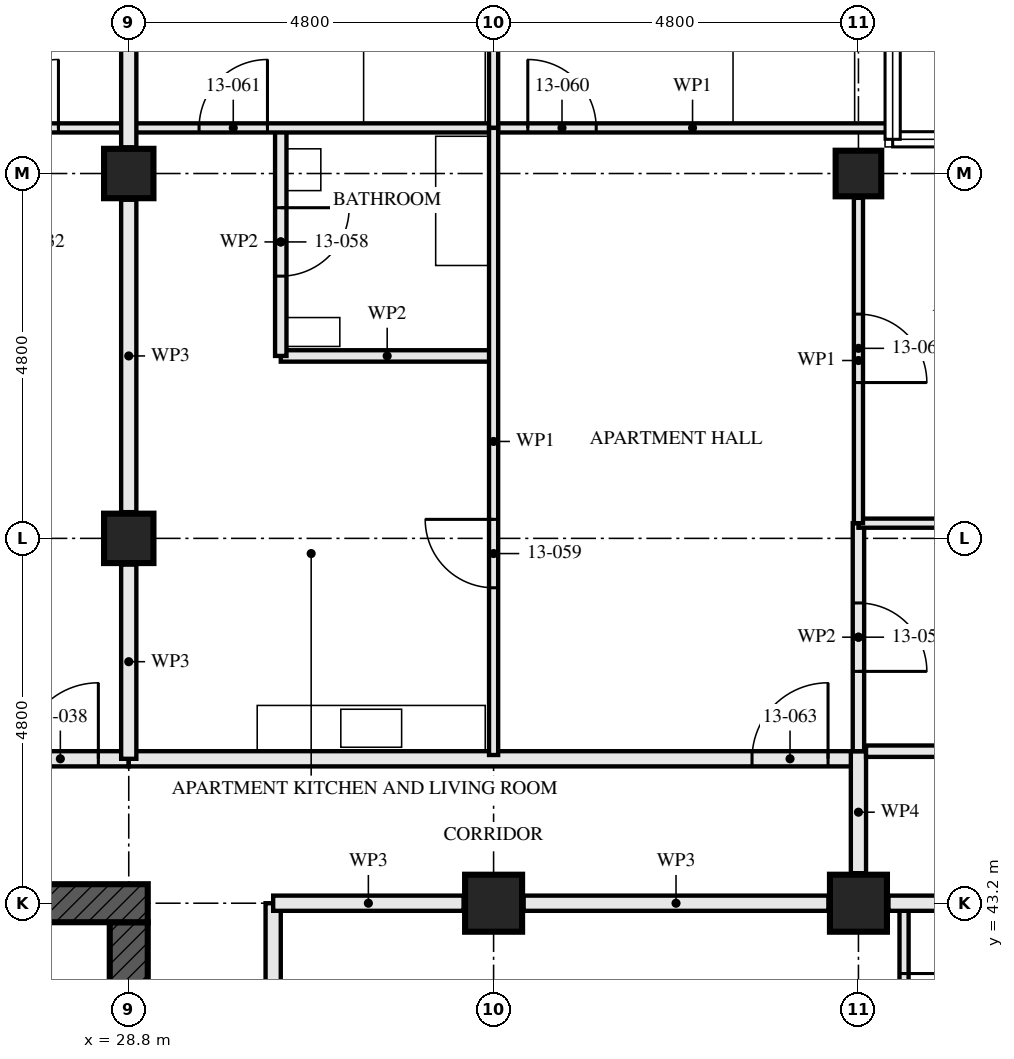
"""IFC4 building model, lengths in metres.
Left out: names, types, materials, properties, quantities, classifications, styles, units other than length and angle.
Written with IfcOpenShell. Run it as: python <this file> out.ifc"""

import sys

from ifc_helpers import new_model, si_unit, direction, frame, frame_2d, origin, origin_2d, place, context, subcontext, project, spatial, rectangle, hollow_rectangle, extrude, element, fill, save


model = new_model("IFC4")
c1 = context("Model", 3, precision=1e-05, world=origin(), true_north=direction((0.0, 1.0)))
c2 = subcontext(c1, "Body", "Model", "MODEL_VIEW")
j1 = project(units=[si_unit("LENGTHUNIT", "METRE"), si_unit("PLANEANGLEUNIT", "RADIAN")], contexts=[c1])
p1 = place(None, origin())
s1 = spatial("IfcSite", under=j1, at=p1, CompositionType="ELEMENT")
p2 = place(p1, origin())
s2 = spatial("IfcBuilding", under=s1, at=p2, CompositionType="ELEMENT")
p3 = place(p2, frame((0.0, 0.0, 51.5)))
s3 = spatial("IfcBuildingStorey", under=s2, at=p3, CompositionType="ELEMENT", Elevation=51.5)
for number, where, z_axis, x_axis in (
    (1, (28.8, 48.0, 0.0), (0.0, 0.0, 1.0), (1.0, 0.0, 0.0)),
    (2, (28.8, 52.8, 0.0), (0.0, 0.0, 1.0), (1.0, 0.0, 0.0)),
):
    element("IfcColumn", number, at=place(p3, frame(where, z_axis=z_axis, x_axis=x_axis)), inside=s3, PredefinedType="COLUMN", context=c2, shape_type="SweptSolid", body=[
        extrude(hollow_rectangle(XDim=0.65, YDim=0.65, WallThickness=0.05, at=origin_2d()), origin(), (0.0, 0.0, 1.0), 3.5),
    ])
for number, where, z_axis, x_axis in (
    (3, (33.6, 43.2, 0.0), (0.0, 0.0, 1.0), (0.0, 1.0, 0.0)),
    (4, (38.4, 43.2, 0.0), (0.0, 0.0, 1.0), (0.0, 1.0, 0.0)),
):
    element("IfcColumn", number, at=place(p3, frame(where, z_axis=z_axis, x_axis=x_axis)), inside=s3, PredefinedType="COLUMN", context=c2, shape_type="SweptSolid", body=[
        extrude(hollow_rectangle(XDim=0.75, YDim=0.75, WallThickness=0.08, at=origin_2d()), origin(), (0.0, 0.0, 1.0), 3.5),
    ])
p4 = place(p3, frame((38.4, 52.8, 0.0), z_axis=(0.0, 0.0, 1.0), x_axis=(0.0, 1.0, 0.0)))
e5 = element("IfcColumn", 5, at=p4, inside=s3, PredefinedType="COLUMN", context=c2, shape_type="SweptSolid", body=[
    extrude(hollow_rectangle(XDim=0.6, YDim=0.6, WallThickness=0.05, at=origin_2d()), origin(), (0.0, 0.0, 1.0), 3.5),
])
p5 = place(p3, frame((29.05, 43.2, -0.17), z_axis=(0.0, 0.0, 1.0), x_axis=(-1.0, 0.0, 0.0)))
e6 = element("IfcWall", 6, at=p5, inside=s3, PredefinedType="SHEAR", context=c2, shape_type="SweptSolid", body=[
    extrude(rectangle(XDim=14.9, YDim=0.5, at=frame_2d((7.45, 0.0))), origin(), (0.0, 0.0, 1.0), 3.5),
])
p6 = place(p5, frame((6.85, 0.0, 0.17)))
e7 = element("IfcOpeningElement", 7, at=p6, cuts=e6, PredefinedType="OPENING", context=c2, shape_type="SweptSolid", body=[
    extrude(rectangle(XDim=1.2, YDim=2.1, at=frame_2d((0.6, 1.05))), frame((0.0, 0.26, 0.0), z_axis=(0.0, -1.0, 0.0), x_axis=(1.0, 0.0, 0.0)), (0.0, 0.0, 1.0), 0.521),
])
p7 = place(p3, frame((28.8, 29.05, -0.17), z_axis=(0.0, 0.0, 1.0), x_axis=(0.0, 1.0, 0.0)))
e8 = element("IfcWall", 8, at=p7, inside=s3, PredefinedType="SHEAR", context=c2, shape_type="SweptSolid", body=[
    extrude(rectangle(XDim=13.9, YDim=0.5, at=frame_2d((6.95, 0.0))), origin(), (0.0, 0.0, 1.0), 3.5),
])
p8 = place(p7, frame((6.35, 0.0, 0.17)))
e9 = element("IfcOpeningElement", 9, at=p8, cuts=e8, PredefinedType="OPENING", context=c2, shape_type="SweptSolid", body=[
    extrude(rectangle(XDim=1.2, YDim=2.1, at=frame_2d((0.6, 1.05))), frame((0.0, 0.26, 0.0), z_axis=(0.0, -1.0, 0.0), x_axis=(1.0, 0.0, 0.0)), (0.0, 0.0, 1.0), 0.521),
])
p9 = place(p3, frame((28.8, 53.4, 0.0), z_axis=(0.0, 0.0, 1.0), x_axis=(-1.0, 0.0, 0.0)))
e10 = element("IfcWall", 10, at=p9, inside=s3, PredefinedType="PARTITIONING", context=c2, shape_type="SweptSolid", body=[
    extrude(rectangle(XDim=4.8, YDim=0.12, at=frame_2d((2.4, 0.0))), origin(), (0.0, 0.0, 1.0), 3.33),
])
p10 = place(p9, frame((0.925, 0.0, 0.0)))
e11 = element("IfcOpeningElement", 11, at=p10, cuts=e10, PredefinedType="OPENING", context=c2, shape_type="SweptSolid", body=[
    extrude(rectangle(XDim=0.9, YDim=2.1, at=frame_2d((0.45, 1.05))), frame((0.0, 0.071, 0.0), z_axis=(0.0, -1.0, 0.0), x_axis=(1.0, 0.0, 0.0)), (0.0, 0.0, 1.0), 0.141),
])
p11 = place(p3, frame((28.8, 45.1, 0.0), z_axis=(0.0, 0.0, 1.0), x_axis=(-1.0, 0.0, 0.0)))
e12 = element("IfcWall", 12, at=p11, inside=s3, PredefinedType="PARTITIONING", context=c2, shape_type="SweptSolid", body=[
    extrude(rectangle(XDim=14.4, YDim=0.2, at=frame_2d((7.2, 0.0))), origin(), (0.0, 0.0, 1.0), 3.33),
])
p12 = place(p11, frame((0.4, 0.0, 0.0)))
e13 = element("IfcOpeningElement", 13, at=p12, cuts=e12, PredefinedType="OPENING", context=c2, shape_type="SweptSolid", body=[
    extrude(rectangle(XDim=1.0, YDim=2.1, at=frame_2d((0.5, 1.05))), frame((0.0, 0.111, 0.0), z_axis=(0.0, -1.0, 0.0), x_axis=(1.0, 0.0, 0.0)), (0.0, 0.0, 1.0), 0.221),
])
p13 = place(p11, frame((5.2, 0.0, 0.0)))
e14 = element("IfcOpeningElement", 14, at=p13, cuts=e12, PredefinedType="OPENING", context=c2, shape_type="SweptSolid", body=[
    extrude(rectangle(XDim=1.0, YDim=2.1, at=frame_2d((0.5, 1.05))), frame((0.0, 0.111, 0.0), z_axis=(0.0, -1.0, 0.0), x_axis=(1.0, 0.0, 0.0)), (0.0, 0.0, 1.0), 0.221),
])
p14 = place(p11, frame((10.0, 0.0, 0.0)))
e15 = element("IfcOpeningElement", 15, at=p14, cuts=e12, PredefinedType="OPENING", context=c2, shape_type="SweptSolid", body=[
    extrude(rectangle(XDim=1.0, YDim=2.1, at=frame_2d((0.5, 1.05))), frame((0.0, 0.111, 0.0), z_axis=(0.0, -1.0, 0.0), x_axis=(1.0, 0.0, 0.0)), (0.0, 0.0, 1.0), 0.221),
])
p15 = place(p3, frame((39.0, 38.4, 0.0), z_axis=(0.0, 0.0, 1.0), x_axis=(0.0, 1.0, 0.0)))
e16 = element("IfcWall", 16, at=p15, inside=s3, PredefinedType="PARTITIONING", context=c2, shape_type="SweptSolid", body=[
    extrude(rectangle(XDim=4.8, YDim=0.12, at=frame_2d((2.4, 0.0))), origin(), (0.0, 0.0, 1.0), 3.33),
])
p16 = place(p15, frame((2.975, 0.0, 0.0)))
e17 = element("IfcOpeningElement", 17, at=p16, cuts=e16, PredefinedType="OPENING", context=c2, shape_type="SweptSolid", body=[
    extrude(rectangle(XDim=0.9, YDim=2.1, at=frame_2d((0.45, 1.05))), frame((0.0, 0.071, 0.0), z_axis=(0.0, -1.0, 0.0), x_axis=(1.0, 0.0, 0.0)), (0.0, 0.0, 1.0), 0.141),
])
p17 = place(p3, frame((30.7, 28.8, 0.0), z_axis=(0.0, 0.0, 1.0), x_axis=(0.0, 1.0, 0.0)))
e18 = element("IfcWall", 18, at=p17, inside=s3, PredefinedType="PARTITIONING", context=c2, shape_type="SweptSolid", body=[
    extrude(rectangle(XDim=14.4, YDim=0.2, at=frame_2d((7.2, 0.0))), origin(), (0.0, 0.0, 1.0), 2.55),
])
p18 = place(p17, frame((1.4, 0.0, 0.0)))
e19 = element("IfcOpeningElement", 19, at=p18, cuts=e18, PredefinedType="OPENING", context=c2, shape_type="SweptSolid", body=[
    extrude(rectangle(XDim=1.0, YDim=2.1, at=frame_2d((0.5, 1.05))), frame((0.0, 0.111, 0.0), z_axis=(0.0, -1.0, 0.0), x_axis=(1.0, 0.0, 0.0)), (0.0, 0.0, 1.0), 0.221),
])
p19 = place(p17, frame((4.1, 0.0, 0.0)))
e20 = element("IfcOpeningElement", 20, at=p19, cuts=e18, PredefinedType="OPENING", context=c2, shape_type="SweptSolid", body=[
    extrude(rectangle(XDim=1.0, YDim=2.1, at=frame_2d((0.5, 1.05))), frame((0.0, 0.111, 0.0), z_axis=(0.0, -1.0, 0.0), x_axis=(1.0, 0.0, 0.0)), (0.0, 0.0, 1.0), 0.221),
])
p20 = place(p17, frame((5.975, 0.0, 0.0)))
e21 = element("IfcOpeningElement", 21, at=p20, cuts=e18, PredefinedType="OPENING", context=c2, shape_type="SweptSolid", body=[
    extrude(rectangle(XDim=1.0, YDim=2.1, at=frame_2d((0.5, 1.05))), frame((0.0, 0.111, 0.0), z_axis=(0.0, -1.0, 0.0), x_axis=(1.0, 0.0, 0.0)), (0.0, 0.0, 1.0), 0.221),
])
p21 = place(p17, frame((10.0, 0.0, 0.0)))
e22 = element("IfcOpeningElement", 22, at=p21, cuts=e18, PredefinedType="OPENING", context=c2, shape_type="SweptSolid", body=[
    extrude(rectangle(XDim=1.0, YDim=2.1, at=frame_2d((0.5, 1.05))), frame((0.0, 0.111, 0.0), z_axis=(0.0, -1.0, 0.0), x_axis=(1.0, 0.0, 0.0)), (0.0, 0.0, 1.0), 0.221),
])
p22 = place(p3, frame((38.4, 48.2, 0.0), z_axis=(0.0, 0.0, 1.0), x_axis=(0.0, -1.0, 0.0)))
e23 = element("IfcWall", 23, at=p22, inside=s3, PredefinedType="PARTITIONING", context=c2, shape_type="SweptSolid", body=[
    extrude(rectangle(XDim=3.0, YDim=0.15, at=frame_2d((1.5, 0.0))), origin(), (0.0, 0.0, 1.0), 2.55),
])
p23 = place(p22, frame((1.05, 0.0, 0.0)))
e24 = element("IfcOpeningElement", 24, at=p23, cuts=e23, PredefinedType="OPENING", context=c2, shape_type="SweptSolid", body=[
    extrude(rectangle(XDim=0.9, YDim=2.1, at=frame_2d((0.45, 1.05))), frame((0.0, 0.085, 0.0), z_axis=(0.0, -1.0, 0.0), x_axis=(1.0, 0.0, 0.0)), (0.0, 0.0, 1.0), 0.171),
])
p24 = place(p3, frame((30.8, 53.4, 0.0), z_axis=(0.0, 0.0, 1.0), x_axis=(0.0, -1.0, 0.0)))
e25 = element("IfcWall", 25, at=p24, inside=s3, PredefinedType="PARTITIONING", context=c2, shape_type="SweptSolid", body=[
    extrude(rectangle(XDim=3.0, YDim=0.15, at=frame_2d((1.5, 0.0))), origin(), (0.0, 0.0, 1.0), 2.55),
])
p25 = place(p24, frame((1.05, 0.0, 0.0)))
e26 = element("IfcOpeningElement", 26, at=p25, cuts=e25, PredefinedType="OPENING", context=c2, shape_type="SweptSolid", body=[
    extrude(rectangle(XDim=0.9, YDim=2.1, at=frame_2d((0.45, 1.05))), frame((0.0, 0.085, 0.0), z_axis=(0.0, -1.0, 0.0), x_axis=(1.0, 0.0, 0.0)), (0.0, 0.0, 1.0), 0.171),
])
p26 = place(p3, frame((33.6, 50.4, 0.0), z_axis=(0.0, 0.0, 1.0), x_axis=(-1.0, 0.0, 0.0)))
e27 = element("IfcWall", 27, at=p26, inside=s3, PredefinedType="PARTITIONING", context=c2, shape_type="SweptSolid", body=[
    extrude(rectangle(XDim=2.8, YDim=0.15, at=frame_2d((1.4, 0.0))), origin(), (0.0, 0.0, 1.0), 3.33),
])
p27 = place(p3, frame((33.6, 53.4, 0.0), z_axis=(0.0, 0.0, 1.0), x_axis=(0.0, -1.0, 0.0)))
e28 = element("IfcWall", 28, at=p27, inside=s3, PredefinedType="PARTITIONING", context=c2, shape_type="SweptSolid", body=[
    extrude(rectangle(XDim=8.25, YDim=0.12, at=frame_2d((4.125, 0.0))), origin(), (0.0, 0.0, 1.0), 2.55),
])
p28 = place(p27, frame((5.15, 0.0, 0.0)))
e29 = element("IfcOpeningElement", 29, at=p28, cuts=e28, PredefinedType="OPENING", context=c2, shape_type="SweptSolid", body=[
    extrude(rectangle(XDim=0.9, YDim=2.1, at=frame_2d((0.45, 1.05))), frame((0.0, 0.071, 0.0), z_axis=(0.0, -1.0, 0.0), x_axis=(1.0, 0.0, 0.0)), (0.0, 0.0, 1.0), 0.141),
])
p29 = place(p3, frame((42.953, 48.2, 0.0), z_axis=(0.0, 0.0, 1.0), x_axis=(-1.0, 0.0, 0.0)))
e30 = element("IfcWall", 30, at=p29, inside=s3, PredefinedType="PARTITIONING", context=c2, shape_type="SweptSolid", body=[
    extrude(rectangle(XDim=4.553, YDim=0.12, at=frame_2d((2.276, 0.0))), origin(), (0.0, 0.0, 1.0), 3.33),
])
p30 = place(p3, frame((38.835, 53.4, 0.0), z_axis=(0.0, 0.0, 1.0), x_axis=(-1.0, 0.0, 0.0)))
e31 = element("IfcWall", 31, at=p30, inside=s3, PredefinedType="PARTITIONING", context=c2, shape_type="SweptSolid", body=[
    extrude(rectangle(XDim=5.235, YDim=0.12, at=frame_2d((2.617, 0.0))), origin(), (0.0, 0.0, 1.0), 2.32),
])
p31 = place(p30, frame((3.885, 0.0, 0.0)))
e32 = element("IfcOpeningElement", 32, at=p31, cuts=e31, PredefinedType="OPENING", context=c2, shape_type="SweptSolid", body=[
    extrude(rectangle(XDim=0.9, YDim=2.1, at=frame_2d((0.45, 1.05))), frame((0.0, 0.071, 0.0), z_axis=(0.0, -1.0, 0.0), x_axis=(1.0, 0.0, 0.0)), (0.0, 0.0, 1.0), 0.141),
])
p32 = place(p3, frame((33.6, 53.4, 0.0), z_axis=(0.0, 0.0, 1.0), x_axis=(-1.0, 0.0, 0.0)))
e33 = element("IfcWall", 33, at=p32, inside=s3, PredefinedType="PARTITIONING", context=c2, shape_type="SweptSolid", body=[
    extrude(rectangle(XDim=4.8, YDim=0.12, at=frame_2d((2.4, 0.0))), origin(), (0.0, 0.0, 1.0), 3.33),
])
p33 = place(p32, frame((2.975, 0.0, 0.0)))
e34 = element("IfcOpeningElement", 34, at=p33, cuts=e33, PredefinedType="OPENING", context=c2, shape_type="SweptSolid", body=[
    extrude(rectangle(XDim=0.9, YDim=2.1, at=frame_2d((0.45, 1.05))), frame((0.0, 0.071, 0.0), z_axis=(0.0, -1.0, 0.0), x_axis=(1.0, 0.0, 0.0)), (0.0, 0.0, 1.0), 0.141),
])
p34 = place(p3, frame((38.4, 52.48, 0.0), z_axis=(0.0, 0.0, 1.0), x_axis=(0.0, -1.0, 0.0)))
e35 = element("IfcWall", 35, at=p34, inside=s3, PredefinedType="PARTITIONING", context=c2, shape_type="SweptSolid", body=[
    extrude(rectangle(XDim=4.28, YDim=0.12, at=frame_2d((2.14, 0.0))), origin(), (0.0, 0.0, 1.0), 3.33),
])
p35 = place(p34, frame((1.53, 0.0, 0.0)))
e36 = element("IfcOpeningElement", 36, at=p35, cuts=e35, PredefinedType="OPENING", context=c2, shape_type="SweptSolid", body=[
    extrude(rectangle(XDim=0.9, YDim=2.1, at=frame_2d((0.45, 1.05))), frame((0.0, 0.071, 0.0), z_axis=(0.0, -1.0, 0.0), x_axis=(1.0, 0.0, 0.0)), (0.0, 0.0, 1.0), 0.141),
])
p36 = place(p3, frame((33.6, 57.353, 0.0), z_axis=(0.0, 0.0, 1.0), x_axis=(0.0, -1.0, 0.0)))
e37 = element("IfcWall", 37, at=p36, inside=s3, PredefinedType="PARTITIONING", context=c2, shape_type="SweptSolid", body=[
    extrude(rectangle(XDim=3.953, YDim=0.12, at=frame_2d((1.977, 0.0))), origin(), (0.0, 0.0, 1.0), 3.33),
])
p37 = place(p3, frame((38.4, 45.1, 0.0), z_axis=(0.0, 0.0, 1.0), x_axis=(-1.0, 0.0, 0.0)))
e38 = element("IfcWall", 38, at=p37, inside=s3, PredefinedType="PARTITIONING", context=c2, shape_type="SweptSolid", body=[
    extrude(rectangle(XDim=9.6, YDim=0.2, at=frame_2d((4.8, 0.0))), origin(), (0.0, 0.0, 1.0), 3.33),
])
p38 = place(p37, frame((0.4, 0.0, 0.0)))
e39 = element("IfcOpeningElement", 39, at=p38, cuts=e38, PredefinedType="OPENING", context=c2, shape_type="SweptSolid", body=[
    extrude(rectangle(XDim=1.0, YDim=2.1, at=frame_2d((0.5, 1.05))), frame((0.0, 0.111, 0.0), z_axis=(0.0, -1.0, 0.0), x_axis=(1.0, 0.0, 0.0)), (0.0, 0.0, 1.0), 0.221),
])
p39 = place(p3, frame((38.4, 45.2, 0.0), z_axis=(0.0, 0.0, 1.0), x_axis=(0.0, -1.0, 0.0)))
e40 = element("IfcWall", 40, at=p39, inside=s3, PredefinedType="PARTITIONING", context=c2, shape_type="SweptSolid", body=[
    extrude(rectangle(XDim=1.605, YDim=0.2, at=frame_2d((0.802, 0.0))), origin(), (0.0, 0.0, 1.0), 3.33),
])
p40 = place(p3, frame((28.8, 45.1, 0.0), z_axis=(0.0, 0.0, 1.0), x_axis=(0.0, 1.0, 0.0)))
e41 = element("IfcWall", 41, at=p40, inside=s3, PredefinedType="PARTITIONING", context=c2, shape_type="SweptSolid", body=[
    extrude(rectangle(XDim=2.555, YDim=0.2, at=frame_2d((1.277, 0.0))), origin(), (0.0, 0.0, 1.0), 2.32),
])
p41 = place(p3, frame((28.8, 48.345, 0.0), z_axis=(0.0, 0.0, 1.0), x_axis=(0.0, 1.0, 0.0)))
e42 = element("IfcWall", 42, at=p41, inside=s3, PredefinedType="PARTITIONING", context=c2, shape_type="SweptSolid", body=[
    extrude(rectangle(XDim=4.11, YDim=0.2, at=frame_2d((2.055, 0.0))), origin(), (0.0, 0.0, 1.0), 2.32),
])
p42 = place(p3, frame((28.8, 53.145, 0.0), z_axis=(0.0, 0.0, 1.0), x_axis=(0.0, 1.0, 0.0)))
e43 = element("IfcWall", 43, at=p42, inside=s3, PredefinedType="PARTITIONING", context=c2, shape_type="SweptSolid", body=[
    extrude(rectangle(XDim=4.208, YDim=0.2, at=frame_2d((2.104, 0.0))), origin(), (0.0, 0.0, 1.0), 2.32),
])
p43 = place(p3, frame((42.896, 43.2, 0.0), z_axis=(0.0, 0.0, 1.0), x_axis=(-1.0, 0.0, 0.0)))
e44 = element("IfcWall", 44, at=p43, inside=s3, PredefinedType="PARTITIONING", context=c2, shape_type="SweptSolid", body=[
    extrude(rectangle(XDim=4.101, YDim=0.2, at=frame_2d((2.05, 0.0))), origin(), (0.0, 0.0, 1.0), 2.32),
])
p44 = place(p3, frame((38.005, 43.2, 0.0), z_axis=(0.0, 0.0, 1.0), x_axis=(-1.0, 0.0, 0.0)))
e45 = element("IfcWall", 45, at=p44, inside=s3, PredefinedType="PARTITIONING", context=c2, shape_type="SweptSolid", body=[
    extrude(rectangle(XDim=4.01, YDim=0.2, at=frame_2d((2.005, 0.0))), origin(), (0.0, 0.0, 1.0), 2.32),
])
p45 = place(p3, frame((33.205, 43.2, 0.0), z_axis=(0.0, 0.0, 1.0), x_axis=(-1.0, 0.0, 0.0)))
e46 = element("IfcWall", 46, at=p45, inside=s3, PredefinedType="PARTITIONING", context=c2, shape_type="SweptSolid", body=[
    extrude(rectangle(XDim=2.505, YDim=0.2, at=frame_2d((1.252, 0.0))), origin(), (0.0, 0.0, 1.0), 2.32),
])
p46 = place(p3, frame((43.63, 45.2, 0.0), z_axis=(0.0, 0.0, 1.0), x_axis=(-1.0, 0.0, 0.0)))
e47 = element("IfcWall", 47, at=p46, inside=s3, PredefinedType="PARTITIONING", context=c2, shape_type="SweptSolid", body=[
    extrude(rectangle(XDim=5.13, YDim=0.15, at=frame_2d((2.565, 0.0))), origin(), (0.0, 0.0, 1.0), 2.32),
])
p47 = place(p10, frame((0.9, 0.0, 0.0), z_axis=(0.0, 0.0, 1.0), x_axis=(-1.0, 0.0, 0.0)))
e48 = element("IfcDoor", 48, at=p47, inside=s3, OperationType="SINGLE_SWING_LEFT", PredefinedType="DOOR", context=c2, shape_type="SweptSolid", body=[
    extrude(rectangle(XDim=0.9, YDim=2.1, at=frame_2d((0.45, 1.05))), frame((0.0, 0.022, 0.0), z_axis=(0.0, -1.0, 0.0), x_axis=(1.0, 0.0, 0.0)), (0.0, 0.0, 1.0), 0.044),
])
fill(e11, e48)
p48 = place(p12, frame((1.0, 0.0, 0.0), z_axis=(0.0, 0.0, 1.0), x_axis=(-1.0, 0.0, 0.0)))
e49 = element("IfcDoor", 49, at=p48, inside=s3, OperationType="SINGLE_SWING_LEFT", PredefinedType="DOOR", context=c2, shape_type="SweptSolid", body=[
    extrude(rectangle(XDim=1.0, YDim=2.1, at=frame_2d((0.5, 1.05))), frame((0.0, 0.027, 0.0), z_axis=(0.0, -1.0, 0.0), x_axis=(1.0, 0.0, 0.0)), (0.0, 0.0, 1.0), 0.054),
])
fill(e13, e49)
p49 = place(p16, frame((0.9, 0.0, 0.0), z_axis=(0.0, 0.0, 1.0), x_axis=(-1.0, 0.0, 0.0)))
e50 = element("IfcDoor", 50, at=p49, inside=s3, OperationType="SINGLE_SWING_RIGHT", PredefinedType="DOOR", context=c2, shape_type="SweptSolid", body=[
    extrude(rectangle(XDim=0.9, YDim=2.1, at=frame_2d((0.45, 1.05))), frame((0.0, 0.022, 0.0), z_axis=(0.0, -1.0, 0.0), x_axis=(1.0, 0.0, 0.0)), (0.0, 0.0, 1.0), 0.044),
])
fill(e17, e50)
p50 = place(p23, origin())
e51 = element("IfcDoor", 51, at=p50, inside=s3, OperationType="SINGLE_SWING_LEFT", PredefinedType="DOOR", context=c2, shape_type="SweptSolid", body=[
    extrude(rectangle(XDim=0.9, YDim=2.1, at=frame_2d((0.45, 1.05))), frame((0.0, 0.022, 0.0), z_axis=(0.0, -1.0, 0.0), x_axis=(1.0, 0.0, 0.0)), (0.0, 0.0, 1.0), 0.044),
])
fill(e24, e51)
p51 = place(p25, origin())
e52 = element("IfcDoor", 52, at=p51, inside=s3, OperationType="SINGLE_SWING_RIGHT", PredefinedType="DOOR", context=c2, shape_type="SweptSolid", body=[
    extrude(rectangle(XDim=0.9, YDim=2.1, at=frame_2d((0.45, 1.05))), frame((0.0, 0.022, 0.0), z_axis=(0.0, -1.0, 0.0), x_axis=(1.0, 0.0, 0.0)), (0.0, 0.0, 1.0), 0.044),
])
fill(e26, e52)
p52 = place(p28, frame((0.9, 0.0, 0.0), z_axis=(0.0, 0.0, 1.0), x_axis=(-1.0, 0.0, 0.0)))
e53 = element("IfcDoor", 53, at=p52, inside=s3, OperationType="SINGLE_SWING_LEFT", PredefinedType="DOOR", context=c2, shape_type="SweptSolid", body=[
    extrude(rectangle(XDim=0.9, YDim=2.1, at=frame_2d((0.45, 1.05))), frame((0.0, 0.022, 0.0), z_axis=(0.0, -1.0, 0.0), x_axis=(1.0, 0.0, 0.0)), (0.0, 0.0, 1.0), 0.044),
])
fill(e29, e53)
p53 = place(p31, frame((0.9, 0.0, 0.0), z_axis=(0.0, 0.0, 1.0), x_axis=(-1.0, 0.0, 0.0)))
e54 = element("IfcDoor", 54, at=p53, inside=s3, OperationType="SINGLE_SWING_RIGHT", PredefinedType="DOOR", context=c2, shape_type="SweptSolid", body=[
    extrude(rectangle(XDim=0.9, YDim=2.1, at=frame_2d((0.45, 1.05))), frame((0.0, 0.022, 0.0), z_axis=(0.0, -1.0, 0.0), x_axis=(1.0, 0.0, 0.0)), (0.0, 0.0, 1.0), 0.044),
])
fill(e32, e54)
p54 = place(p33, frame((0.9, 0.0, 0.0), z_axis=(0.0, 0.0, 1.0), x_axis=(-1.0, 0.0, 0.0)))
e55 = element("IfcDoor", 55, at=p54, inside=s3, OperationType="SINGLE_SWING_LEFT", PredefinedType="DOOR", context=c2, shape_type="SweptSolid", body=[
    extrude(rectangle(XDim=0.9, YDim=2.1, at=frame_2d((0.45, 1.05))), frame((0.0, 0.022, 0.0), z_axis=(0.0, -1.0, 0.0), x_axis=(1.0, 0.0, 0.0)), (0.0, 0.0, 1.0), 0.044),
])
fill(e34, e55)
p55 = place(p35, origin())
e56 = element("IfcDoor", 56, at=p55, inside=s3, OperationType="SINGLE_SWING_LEFT", PredefinedType="DOOR", context=c2, shape_type="SweptSolid", body=[
    extrude(rectangle(XDim=0.9, YDim=2.1, at=frame_2d((0.45, 1.05))), frame((0.0, 0.022, 0.0), z_axis=(0.0, -1.0, 0.0), x_axis=(1.0, 0.0, 0.0)), (0.0, 0.0, 1.0), 0.044),
])
fill(e36, e56)
p56 = place(p38, frame((1.0, 0.0, 0.0), z_axis=(0.0, 0.0, 1.0), x_axis=(-1.0, 0.0, 0.0)))
e57 = element("IfcDoor", 57, at=p56, inside=s3, OperationType="SINGLE_SWING_LEFT", PredefinedType="DOOR", context=c2, shape_type="SweptSolid", body=[
    extrude(rectangle(XDim=1.0, YDim=2.1, at=frame_2d((0.5, 1.05))), frame((0.0, 0.027, 0.0), z_axis=(0.0, -1.0, 0.0), x_axis=(1.0, 0.0, 0.0)), (0.0, 0.0, 1.0), 0.054),
])
fill(e39, e57)
save(model, sys.argv[1])
